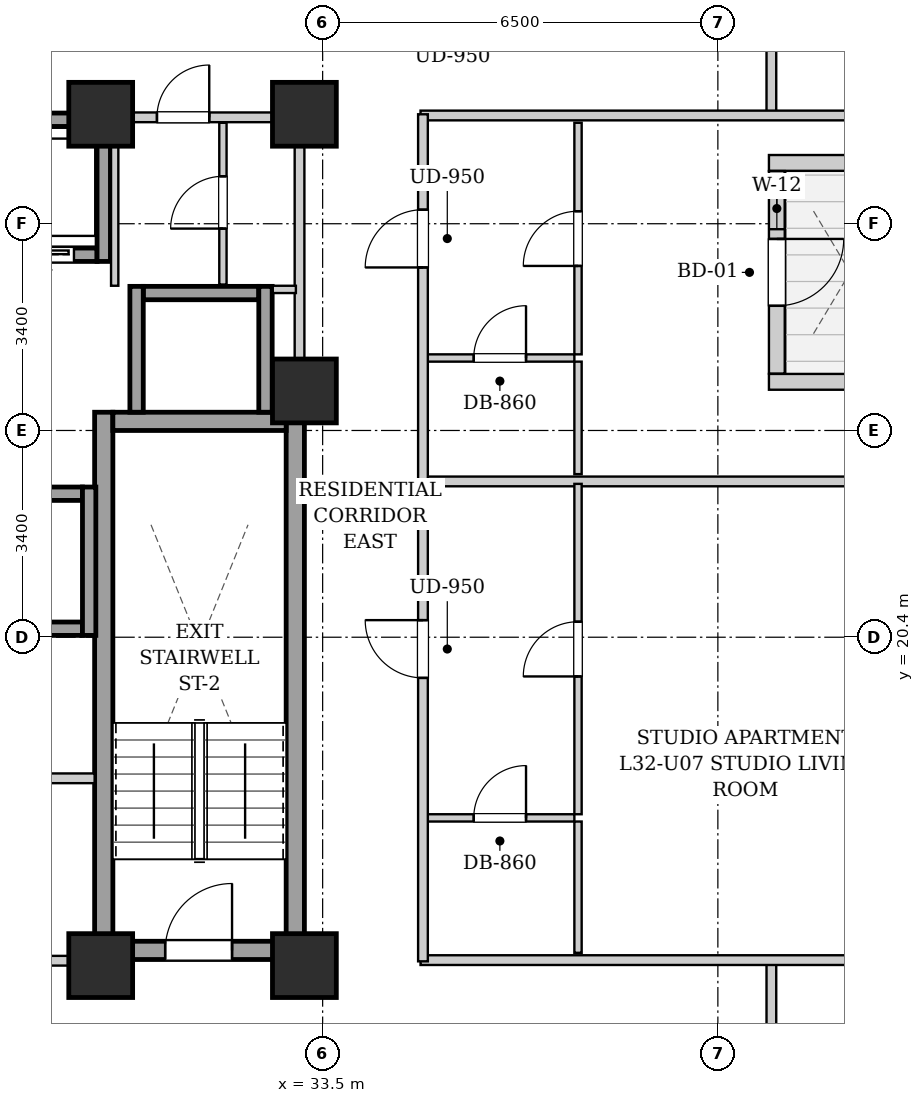
"""IFC4 building model, lengths in metres.
Left out: names, types, materials, properties, quantities, classifications, styles, units other than length and angle.
Written with IfcOpenShell. Run it as: python <this file> out.ifc"""

import sys

from ifc_helpers import new_model, si_unit, direction, frame, frame_2d, origin, origin_2d, place, context, subcontext, project, spatial, rectangle, extrude, element, fill, save


model = new_model("IFC4")
c1 = context("Model", 3, precision=1e-05, world=origin(), true_north=direction((0.0, 1.0)))
c2 = subcontext(c1, "Body", "Model", "MODEL_VIEW")
j1 = project(units=[si_unit("LENGTHUNIT", "METRE"), si_unit("PLANEANGLEUNIT", "RADIAN")], contexts=[c1])
p1 = place(None, origin())
s1 = spatial("IfcSite", under=j1, at=p1, CompositionType="ELEMENT")
p2 = place(p1, origin())
s2 = spatial("IfcBuilding", under=s1, at=p2, CompositionType="ELEMENT")
p3 = place(p2, frame((0.0, 0.0, 113.5)))
s3 = spatial("IfcBuildingStorey", under=s2, at=p3, CompositionType="ELEMENT", Elevation=113.5)
for number, where, z_axis, x_axis in (
    (1, (29.85, 15.0, 0.0), (0.0, 0.0, 1.0), (1.0, 0.0, 0.0)),
    (2, (33.2, 15.0, 0.0), (0.0, 0.0, 1.0), (1.0, 0.0, 0.0)),
    (3, (29.85, 29.0, 0.0), (0.0, 0.0, 1.0), (1.0, 0.0, 0.0)),
    (4, (33.2, 29.0, 0.0), (0.0, 0.0, 1.0), (1.0, 0.0, 0.0)),
    (5, (33.2, 24.45, 0.0), (0.0, 0.0, 1.0), (1.0, 0.0, 0.0)),
):
    element("IfcColumn", number, at=place(p3, frame(where, z_axis=z_axis, x_axis=x_axis)), inside=s3, PredefinedType="COLUMN", context=c2, shape_type="SweptSolid", body=[
        extrude(rectangle(XDim=1.05, YDim=1.05, at=origin_2d()), origin(), (0.0, 0.0, 1.0), 3.2),
    ])
p4 = place(p3, frame((43.24, 28.2, 0.0), z_axis=(0.0, 0.0, 1.0), x_axis=(-1.0, 0.0, 0.0)))
e6 = element("IfcWall", 6, at=p4, inside=s3, PredefinedType="SOLIDWALL", context=c2, shape_type="SweptSolid", body=[
    extrude(rectangle(XDim=2.4, YDim=0.26, at=frame_2d((1.2, 0.0))), origin(), (0.0, 0.0, 1.0), 2.94),
])
p5 = place(p3, frame((40.97, 28.066, 0.0), z_axis=(0.0, 0.0, 1.0), x_axis=(0.0, -1.0, 0.0)))
e7 = element("IfcWall", 7, at=p5, inside=s3, PredefinedType="SOLIDWALL", context=c2, shape_type="SweptSolid", body=[
    extrude(rectangle(XDim=3.332, YDim=0.26, at=frame_2d((1.666, 0.0))), origin(), (0.0, 0.0, 1.0), 2.94),
])
p6 = place(p5, frame((1.116, 0.0, 0.0)))
e8 = element("IfcOpeningElement", 8, at=p6, cuts=e7, PredefinedType="OPENING", context=c2, shape_type="SweptSolid", body=[
    extrude(rectangle(XDim=1.1, YDim=2.0, at=frame_2d((0.55, 1.0))), frame((0.0, 0.14, 0.0), z_axis=(0.0, -1.0, 0.0), x_axis=(1.0, 0.0, 0.0)), (0.0, 0.0, 1.0), 0.28),
])
p7 = place(p5, frame((0.276, 0.0, 0.55)))
e9 = element("IfcOpeningElement", 9, at=p7, cuts=e7, PredefinedType="OPENING", context=c2, shape_type="SweptSolid", body=[
    extrude(rectangle(XDim=0.68, YDim=1.2, at=frame_2d((0.34, 0.6))), frame((0.0, 0.14, 0.0), z_axis=(0.0, -1.0, 0.0), x_axis=(1.0, 0.0, 0.0)), (0.0, 0.0, 1.0), 0.28),
])
p8 = place(p3, frame((40.84, 24.6, 0.0), z_axis=(0.0, 0.0, 1.0), x_axis=(1.0, 0.0, 0.0)))
e10 = element("IfcWall", 10, at=p8, inside=s3, PredefinedType="SOLIDWALL", context=c2, shape_type="SweptSolid", body=[
    extrude(rectangle(XDim=2.4, YDim=0.26, at=frame_2d((1.2, 0.0))), origin(), (0.0, 0.0, 1.0), 2.94),
])
for number, where, z_axis, x_axis in (
    (11, (29.9, 15.1, 0.0), (0.0, 0.0, 1.0), (0.0, 1.0, 0.0)),
    (12, (33.05, 15.1, 0.0), (0.0, 0.0, 1.0), (0.0, 1.0, 0.0)),
):
    element("IfcWall", number, at=place(p3, frame(where, z_axis=z_axis, x_axis=x_axis)), inside=s3, PredefinedType="SHEAR", context=c2, shape_type="SweptSolid", body=[
        extrude(rectangle(XDim=9.0, YDim=0.3, at=frame_2d((4.5, 0.0))), origin(), (0.0, 0.0, 1.0), 2.94),
    ])
p9 = place(p3, frame((30.05, 23.95, 0.0), z_axis=(0.0, 0.0, 1.0), x_axis=(1.0, 0.0, 0.0)))
e13 = element("IfcWall", 13, at=p9, inside=s3, PredefinedType="SHEAR", context=c2, shape_type="SweptSolid", body=[
    extrude(rectangle(XDim=2.85, YDim=0.3, at=frame_2d((1.425, 0.0))), origin(), (0.0, 0.0, 1.0), 2.94),
])
p10 = place(p3, frame((30.05, 15.25, 0.0), z_axis=(0.0, 0.0, 1.0), x_axis=(1.0, 0.0, 0.0)))
e14 = element("IfcWall", 14, at=p10, inside=s3, PredefinedType="SHEAR", context=c2, shape_type="SweptSolid", body=[
    extrude(rectangle(XDim=2.85, YDim=0.3, at=frame_2d((1.425, 0.0))), origin(), (0.0, 0.0, 1.0), 2.94),
])
p11 = place(p10, frame((0.86, 0.0, 0.0)))
e15 = element("IfcOpeningElement", 15, at=p11, cuts=e14, PredefinedType="OPENING", context=c2, shape_type="SweptSolid", body=[
    extrude(rectangle(XDim=1.1, YDim=2.05, at=frame_2d((0.55, 1.025))), frame((0.0, 0.16, 0.0), z_axis=(0.0, -1.0, 0.0), x_axis=(1.0, 0.0, 0.0)), (0.0, 0.0, 1.0), 0.32),
])
p12 = place(p3, frame((27.93, 26.69, 0.0), z_axis=(0.0, 0.0, 1.0), x_axis=(1.0, 0.0, 0.0)))
e16 = element("IfcWall", 16, at=p12, inside=s3, PredefinedType="SHEAR", context=c2, shape_type="SweptSolid", body=[
    extrude(rectangle(XDim=1.86, YDim=0.22, at=frame_2d((0.93, 0.0))), origin(), (0.0, 0.0, 1.0), 2.94),
])
p13 = place(p12, frame((0.38, 0.0, 0.0)))
e17 = element("IfcOpeningElement", 17, at=p13, cuts=e16, PredefinedType="OPENING", context=c2, shape_type="SweptSolid", body=[
    extrude(rectangle(XDim=1.1, YDim=2.15, at=frame_2d((0.55, 1.075))), frame((0.0, 0.12, 0.0), z_axis=(0.0, -1.0, 0.0), x_axis=(1.0, 0.0, 0.0)), (0.0, 0.0, 1.0), 0.24),
])
p14 = place(p3, frame((27.93, 28.91, 0.0), z_axis=(0.0, 0.0, 1.0), x_axis=(1.0, 0.0, 0.0)))
e18 = element("IfcWall", 18, at=p14, inside=s3, PredefinedType="SHEAR", context=c2, shape_type="SweptSolid", body=[
    extrude(rectangle(XDim=1.86, YDim=0.22, at=frame_2d((0.93, 0.0))), origin(), (0.0, 0.0, 1.0), 2.94),
])
p15 = place(p3, frame((29.9, 26.58, 0.0), z_axis=(0.0, 0.0, 1.0), x_axis=(0.0, 1.0, 0.0)))
e19 = element("IfcWall", 19, at=p15, inside=s3, PredefinedType="SHEAR", context=c2, shape_type="SweptSolid", body=[
    extrude(rectangle(XDim=2.44, YDim=0.22, at=frame_2d((1.22, 0.0))), origin(), (0.0, 0.0, 1.0), 2.94),
])
for number, where, z_axis, x_axis in (
    (20, (27.65, 20.54, 0.0), (0.0, 0.0, 1.0), (1.0, 0.0, 0.0)),
    (21, (27.65, 22.76, 0.0), (0.0, 0.0, 1.0), (1.0, 0.0, 0.0)),
):
    element("IfcWall", number, at=place(p3, frame(where, z_axis=z_axis, x_axis=x_axis)), inside=s3, PredefinedType="SHEAR", context=c2, shape_type="SweptSolid", body=[
        extrude(rectangle(XDim=1.9, YDim=0.22, at=frame_2d((0.95, 0.0))), origin(), (0.0, 0.0, 1.0), 2.94),
    ])
p16 = place(p3, frame((29.66, 20.43, 0.0), z_axis=(0.0, 0.0, 1.0), x_axis=(0.0, 1.0, 0.0)))
e22 = element("IfcWall", 22, at=p16, inside=s3, PredefinedType="SHEAR", context=c2, shape_type="SweptSolid", body=[
    extrude(rectangle(XDim=2.44, YDim=0.22, at=frame_2d((1.22, 0.0))), origin(), (0.0, 0.0, 1.0), 2.94),
])
p17 = place(p3, frame((30.55, 26.06, 0.0), z_axis=(0.0, 0.0, 1.0), x_axis=(1.0, 0.0, 0.0)))
e23 = element("IfcWall", 23, at=p17, inside=s3, PredefinedType="SHEAR", context=c2, shape_type="SweptSolid", body=[
    extrude(rectangle(XDim=1.9, YDim=0.22, at=frame_2d((0.95, 0.0))), origin(), (0.0, 0.0, 1.0), 2.94),
])
for number, where, z_axis, x_axis in (
    (24, (30.44, 24.1, 0.0), (0.0, 0.0, 1.0), (0.0, 1.0, 0.0)),
    (25, (32.56, 24.1, 0.0), (0.0, 0.0, 1.0), (0.0, 1.0, 0.0)),
):
    element("IfcWall", number, at=place(p3, frame(where, z_axis=z_axis, x_axis=x_axis)), inside=s3, PredefinedType="SHEAR", context=c2, shape_type="SweptSolid", body=[
        extrude(rectangle(XDim=2.07, YDim=0.22, at=frame_2d((1.035, 0.0))), origin(), (0.0, 0.0, 1.0), 2.94),
    ])
p18 = place(p3, frame((21.25, 15.08, 0.0), z_axis=(0.0, 0.0, 1.0), x_axis=(1.0, 0.0, 0.0)))
e26 = element("IfcWall", 26, at=p18, inside=s3, PredefinedType="PARTITIONING", context=c2, shape_type="SweptSolid", body=[
    extrude(rectangle(XDim=8.5, YDim=0.16, at=frame_2d((4.25, 0.0))), origin(), (0.0, 0.0, 1.0), 2.313),
])
p19 = place(p18, frame((3.725, 0.0, 0.0)))
e27 = element("IfcOpeningElement", 27, at=p19, cuts=e26, PredefinedType="OPENING", context=c2, shape_type="SweptSolid", body=[
    extrude(rectangle(XDim=1.05, YDim=2.05, at=frame_2d((0.525, 1.025))), frame((0.0, 0.09, 0.0), z_axis=(0.0, -1.0, 0.0), x_axis=(1.0, 0.0, 0.0)), (0.0, 0.0, 1.0), 0.18),
])
p20 = place(p3, frame((28.65, 18.08, 0.0), z_axis=(0.0, 0.0, 1.0), x_axis=(1.0, 0.0, 0.0)))
e28 = element("IfcWall", 28, at=p20, inside=s3, PredefinedType="PARTITIONING", context=c2, shape_type="SweptSolid", body=[
    extrude(rectangle(XDim=1.1, YDim=0.16, at=frame_2d((0.55, 0.0))), origin(), (0.0, 0.0, 1.0), 2.94),
])
p21 = place(p3, frame((33.12, 24.12, 0.0), z_axis=(0.0, 0.0, 1.0), x_axis=(0.0, 1.0, 0.0)))
e29 = element("IfcWall", 29, at=p21, inside=s3, PredefinedType="PARTITIONING", context=c2, shape_type="SweptSolid", body=[
    extrude(rectangle(XDim=4.76, YDim=0.16, at=frame_2d((2.38, 0.0))), origin(), (0.0, 0.0, 1.0), 2.94),
])
p22 = place(p3, frame((30.08, 26.18, 0.0), z_axis=(0.0, 0.0, 1.0), x_axis=(0.0, 1.0, 0.0)))
e30 = element("IfcWall", 30, at=p22, inside=s3, PredefinedType="PARTITIONING", context=c2, shape_type="SweptSolid", body=[
    extrude(rectangle(XDim=2.68, YDim=0.12, at=frame_2d((1.34, 0.0))), origin(), (0.0, 0.0, 1.0), 2.94),
])
p23 = place(p3, frame((32.68, 26.12, 0.0), z_axis=(0.0, 0.0, 1.0), x_axis=(1.0, 0.0, 0.0)))
e31 = element("IfcWall", 31, at=p23, inside=s3, PredefinedType="PARTITIONING", context=c2, shape_type="SweptSolid", body=[
    extrude(rectangle(XDim=0.38, YDim=0.12, at=frame_2d((0.19, 0.0))), origin(), (0.0, 0.0, 1.0), 2.94),
])
p24 = place(p3, frame((31.86, 26.2, 0.0), z_axis=(0.0, 0.0, 1.0), x_axis=(0.0, 1.0, 0.0)))
e32 = element("IfcWall", 32, at=p24, inside=s3, PredefinedType="PARTITIONING", context=c2, shape_type="SweptSolid", body=[
    extrude(rectangle(XDim=2.66, YDim=0.12, at=frame_2d((1.33, 0.0))), origin(), (0.0, 0.0, 1.0), 2.94),
])
p25 = place(p24, frame((0.92, 0.0, 0.0)))
e33 = element("IfcOpeningElement", 33, at=p25, cuts=e32, PredefinedType="OPENING", context=c2, shape_type="SweptSolid", body=[
    extrude(rectangle(XDim=0.86, YDim=2.05, at=frame_2d((0.43, 1.025))), frame((0.0, 0.07, 0.0), z_axis=(0.0, -1.0, 0.0), x_axis=(1.0, 0.0, 0.0)), (0.0, 0.0, 1.0), 0.14),
])
p26 = place(p3, frame((30.08, 28.95, 0.0), z_axis=(0.0, 0.0, 1.0), x_axis=(1.0, 0.0, 0.0)))
e34 = element("IfcWall", 34, at=p26, inside=s3, PredefinedType="PARTITIONING", context=c2, shape_type="SweptSolid", body=[
    extrude(rectangle(XDim=2.96, YDim=0.16, at=frame_2d((1.48, 0.0))), origin(), (0.0, 0.0, 1.0), 2.94),
])
p27 = place(p26, frame((0.695, 0.0, 0.0)))
e35 = element("IfcOpeningElement", 35, at=p27, cuts=e34, PredefinedType="OPENING", context=c2, shape_type="SweptSolid", body=[
    extrude(rectangle(XDim=0.86, YDim=2.05, at=frame_2d((0.43, 1.025))), frame((0.0, 0.09, 0.0), z_axis=(0.0, -1.0, 0.0), x_axis=(1.0, 0.0, 0.0)), (0.0, 0.0, 1.0), 0.18),
])
for number, where, z_axis, x_axis in (
    (36, (40.88, 13.35, 0.0), (0.0, 0.0, 1.0), (0.0, 1.0, 0.0)),
    (37, (40.88, 28.98, 0.0), (0.0, 0.0, 1.0), (0.0, 1.0, 0.0)),
):
    element("IfcWall", number, at=place(p3, frame(where, z_axis=z_axis, x_axis=x_axis)), inside=s3, PredefinedType="PARTITIONING", context=c2, shape_type="SweptSolid", body=[
        extrude(rectangle(XDim=1.74, YDim=0.16, at=frame_2d((0.87, 0.0))), origin(), (0.0, 0.0, 1.0), 2.94),
    ])
for number, where, z_axis, x_axis in (
    (38, (35.11, 15.09, 0.0), (0.0, 0.0, 1.0), (1.0, 0.0, 0.0)),
    (39, (35.11, 28.98, 0.0), (0.0, 0.0, 1.0), (1.0, 0.0, 0.0)),
):
    element("IfcWall", number, at=place(p3, frame(where, z_axis=z_axis, x_axis=x_axis)), inside=s3, PredefinedType="PARTITIONING", context=c2, shape_type="SweptSolid", body=[
        extrude(rectangle(XDim=8.01, YDim=0.16, at=frame_2d((4.005, 0.0))), origin(), (0.0, 0.0, 1.0), 2.313),
    ])
p28 = place(p3, frame((35.19, 22.962, 0.0), z_axis=(0.0, 0.0, 1.0), x_axis=(1.0, 0.0, 0.0)))
e40 = element("IfcWall", 40, at=p28, inside=s3, PredefinedType="PARTITIONING", context=c2, shape_type="SweptSolid", body=[
    extrude(rectangle(XDim=7.93, YDim=0.16, at=frame_2d((3.965, 0.0))), origin(), (0.0, 0.0, 1.0), 2.94),
])
p29 = place(p3, frame((35.19, 17.429, 0.0), z_axis=(0.0, 0.0, 1.0), x_axis=(1.0, 0.0, 0.0)))
e41 = element("IfcWall", 41, at=p29, inside=s3, PredefinedType="PARTITIONING", context=c2, shape_type="SweptSolid", body=[
    extrude(rectangle(XDim=2.45, YDim=0.12, at=frame_2d((1.225, 0.0))), origin(), (0.0, 0.0, 1.0), 2.94),
])
p30 = place(p29, frame((0.795, 0.0, 0.0)))
e42 = element("IfcOpeningElement", 42, at=p30, cuts=e41, PredefinedType="OPENING", context=c2, shape_type="SweptSolid", body=[
    extrude(rectangle(XDim=0.86, YDim=2.05, at=frame_2d((0.43, 1.025))), frame((0.0, 0.07, 0.0), z_axis=(0.0, -1.0, 0.0), x_axis=(1.0, 0.0, 0.0)), (0.0, 0.0, 1.0), 0.14),
])
p31 = place(p3, frame((37.7, 15.21, 0.0), z_axis=(0.0, 0.0, 1.0), x_axis=(0.0, 1.0, 0.0)))
e43 = element("IfcWall", 43, at=p31, inside=s3, PredefinedType="PARTITIONING", context=c2, shape_type="SweptSolid", body=[
    extrude(rectangle(XDim=2.159, YDim=0.12, at=frame_2d((1.08, 0.0))), origin(), (0.0, 0.0, 1.0), 2.94),
])
p32 = place(p3, frame((37.7, 17.489, 0.0), z_axis=(0.0, 0.0, 1.0), x_axis=(0.0, 1.0, 0.0)))
e44 = element("IfcWall", 44, at=p32, inside=s3, PredefinedType="PARTITIONING", context=c2, shape_type="SweptSolid", body=[
    extrude(rectangle(XDim=5.433, YDim=0.12, at=frame_2d((2.717, 0.0))), origin(), (0.0, 0.0, 1.0), 2.94),
])
p33 = place(p32, frame((2.266, 0.0, 0.0)))
e45 = element("IfcOpeningElement", 45, at=p33, cuts=e44, PredefinedType="OPENING", context=c2, shape_type="SweptSolid", body=[
    extrude(rectangle(XDim=0.9, YDim=2.05, at=frame_2d((0.45, 1.025))), frame((0.0, 0.07, 0.0), z_axis=(0.0, -1.0, 0.0), x_axis=(1.0, 0.0, 0.0)), (0.0, 0.0, 1.0), 0.14),
])
p34 = place(p3, frame((35.19, 24.992, 0.0), z_axis=(0.0, 0.0, 1.0), x_axis=(1.0, 0.0, 0.0)))
e46 = element("IfcWall", 46, at=p34, inside=s3, PredefinedType="PARTITIONING", context=c2, shape_type="SweptSolid", body=[
    extrude(rectangle(XDim=2.45, YDim=0.12, at=frame_2d((1.225, 0.0))), origin(), (0.0, 0.0, 1.0), 2.94),
])
p35 = place(p34, frame((0.795, 0.0, 0.0)))
e47 = element("IfcOpeningElement", 47, at=p35, cuts=e46, PredefinedType="OPENING", context=c2, shape_type="SweptSolid", body=[
    extrude(rectangle(XDim=0.86, YDim=2.05, at=frame_2d((0.43, 1.025))), frame((0.0, 0.07, 0.0), z_axis=(0.0, -1.0, 0.0), x_axis=(1.0, 0.0, 0.0)), (0.0, 0.0, 1.0), 0.14),
])
p36 = place(p3, frame((37.7, 23.082, 0.0), z_axis=(0.0, 0.0, 1.0), x_axis=(0.0, 1.0, 0.0)))
e48 = element("IfcWall", 48, at=p36, inside=s3, PredefinedType="PARTITIONING", context=c2, shape_type="SweptSolid", body=[
    extrude(rectangle(XDim=1.85, YDim=0.12, at=frame_2d((0.925, 0.0))), origin(), (0.0, 0.0, 1.0), 2.94),
])
p37 = place(p3, frame((37.7, 25.052, 0.0), z_axis=(0.0, 0.0, 1.0), x_axis=(0.0, 1.0, 0.0)))
e49 = element("IfcWall", 49, at=p37, inside=s3, PredefinedType="PARTITIONING", context=c2, shape_type="SweptSolid", body=[
    extrude(rectangle(XDim=3.808, YDim=0.12, at=frame_2d((1.904, 0.0))), origin(), (0.0, 0.0, 1.0), 2.94),
])
p38 = place(p37, frame((1.454, 0.0, 0.0)))
e50 = element("IfcOpeningElement", 50, at=p38, cuts=e49, PredefinedType="OPENING", context=c2, shape_type="SweptSolid", body=[
    extrude(rectangle(XDim=0.9, YDim=2.05, at=frame_2d((0.45, 1.025))), frame((0.0, 0.07, 0.0), z_axis=(0.0, -1.0, 0.0), x_axis=(1.0, 0.0, 0.0)), (0.0, 0.0, 1.0), 0.14),
])
p39 = place(p3, frame((35.15, 15.07, 0.0), z_axis=(0.0, 0.0, 1.0), x_axis=(0.0, 1.0, 0.0)))
e51 = element("IfcWall", 51, at=p39, inside=s3, PredefinedType="PARTITIONING", context=c2, shape_type="SweptSolid", body=[
    extrude(rectangle(XDim=13.93, YDim=0.16, at=frame_2d((6.965, 0.0))), origin(), (0.0, 0.0, 1.0), 2.94),
])
p40 = place(p39, frame((4.661, 0.0, 0.0)))
e52 = element("IfcOpeningElement", 52, at=p40, cuts=e51, PredefinedType="OPENING", context=c2, shape_type="SweptSolid", body=[
    extrude(rectangle(XDim=0.95, YDim=2.1, at=frame_2d((0.475, 1.05))), frame((0.0, 0.09, 0.0), z_axis=(0.0, -1.0, 0.0), x_axis=(1.0, 0.0, 0.0)), (0.0, 0.0, 1.0), 0.18),
])
p41 = place(p39, frame((11.411, 0.0, 0.0)))
e53 = element("IfcOpeningElement", 53, at=p41, cuts=e51, PredefinedType="OPENING", context=c2, shape_type="SweptSolid", body=[
    extrude(rectangle(XDim=0.95, YDim=2.1, at=frame_2d((0.475, 1.05))), frame((0.0, 0.09, 0.0), z_axis=(0.0, -1.0, 0.0), x_axis=(1.0, 0.0, 0.0)), (0.0, 0.0, 1.0), 0.18),
])
p42 = place(p11, origin())
e54 = element("IfcDoor", 54, at=p42, inside=s3, OperationType="SINGLE_SWING_RIGHT", PredefinedType="DOOR", context=c2, shape_type="SweptSolid", body=[
    extrude(rectangle(XDim=1.1, YDim=2.05, at=frame_2d((0.55, 1.025))), frame((0.0, 0.025, 0.0), z_axis=(0.0, -1.0, 0.0), x_axis=(1.0, 0.0, 0.0)), (0.0, 0.0, 1.0), 0.05),
])
fill(e15, e54)
p43 = place(p13, origin())
e55 = element("IfcDoor", 55, at=p43, inside=s3, OperationType="SLIDING_TO_LEFT", PredefinedType="DOOR", context=c2, shape_type="SweptSolid", body=[
    extrude(rectangle(XDim=1.1, YDim=2.15, at=frame_2d((0.55, 1.075))), frame((0.0, 0.025, 0.0), z_axis=(0.0, -1.0, 0.0), x_axis=(1.0, 0.0, 0.0)), (0.0, 0.0, 1.0), 0.05),
])
fill(e17, e55)
p44 = place(p25, origin())
e56 = element("IfcDoor", 56, at=p44, inside=s3, OperationType="SINGLE_SWING_LEFT", PredefinedType="DOOR", context=c2, shape_type="SweptSolid", body=[
    extrude(rectangle(XDim=0.86, YDim=2.05, at=frame_2d((0.43, 1.025))), frame((0.0, 0.025, 0.0), z_axis=(0.0, -1.0, 0.0), x_axis=(1.0, 0.0, 0.0)), (0.0, 0.0, 1.0), 0.05),
])
fill(e33, e56)
p45 = place(p27, origin())
e57 = element("IfcDoor", 57, at=p45, inside=s3, OperationType="SINGLE_SWING_RIGHT", PredefinedType="DOOR", context=c2, shape_type="SweptSolid", body=[
    extrude(rectangle(XDim=0.86, YDim=2.05, at=frame_2d((0.43, 1.025))), frame((0.0, 0.025, 0.0), z_axis=(0.0, -1.0, 0.0), x_axis=(1.0, 0.0, 0.0)), (0.0, 0.0, 1.0), 0.05),
])
fill(e35, e57)
p46 = place(p30, origin())
e58 = element("IfcDoor", 58, at=p46, inside=s3, OperationType="SINGLE_SWING_RIGHT", PredefinedType="DOOR", context=c2, shape_type="SweptSolid", body=[
    extrude(rectangle(XDim=0.86, YDim=2.05, at=frame_2d((0.43, 1.025))), frame((0.0, 0.025, 0.0), z_axis=(0.0, -1.0, 0.0), x_axis=(1.0, 0.0, 0.0)), (0.0, 0.0, 1.0), 0.05),
])
fill(e42, e58)
p47 = place(p33, origin())
e59 = element("IfcDoor", 59, at=p47, inside=s3, OperationType="SINGLE_SWING_LEFT", PredefinedType="DOOR", context=c2, shape_type="SweptSolid", body=[
    extrude(rectangle(XDim=0.9, YDim=2.05, at=frame_2d((0.45, 1.025))), frame((0.0, 0.025, 0.0), z_axis=(0.0, -1.0, 0.0), x_axis=(1.0, 0.0, 0.0)), (0.0, 0.0, 1.0), 0.05),
])
fill(e45, e59)
p48 = place(p35, origin())
e60 = element("IfcDoor", 60, at=p48, inside=s3, OperationType="SINGLE_SWING_RIGHT", PredefinedType="DOOR", context=c2, shape_type="SweptSolid", body=[
    extrude(rectangle(XDim=0.86, YDim=2.05, at=frame_2d((0.43, 1.025))), frame((0.0, 0.025, 0.0), z_axis=(0.0, -1.0, 0.0), x_axis=(1.0, 0.0, 0.0)), (0.0, 0.0, 1.0), 0.05),
])
fill(e47, e60)
p49 = place(p38, origin())
e61 = element("IfcDoor", 61, at=p49, inside=s3, OperationType="SINGLE_SWING_LEFT", PredefinedType="DOOR", context=c2, shape_type="SweptSolid", body=[
    extrude(rectangle(XDim=0.9, YDim=2.05, at=frame_2d((0.45, 1.025))), frame((0.0, 0.025, 0.0), z_axis=(0.0, -1.0, 0.0), x_axis=(1.0, 0.0, 0.0)), (0.0, 0.0, 1.0), 0.05),
])
fill(e50, e61)
p50 = place(p40, origin())
e62 = element("IfcDoor", 62, at=p50, inside=s3, OperationType="SINGLE_SWING_RIGHT", PredefinedType="DOOR", context=c2, shape_type="SweptSolid", body=[
    extrude(rectangle(XDim=0.95, YDim=2.1, at=frame_2d((0.475, 1.05))), frame((0.0, 0.025, 0.0), z_axis=(0.0, -1.0, 0.0), x_axis=(1.0, 0.0, 0.0)), (0.0, 0.0, 1.0), 0.05),
])
fill(e52, e62)
p51 = place(p41, origin())
e63 = element("IfcDoor", 63, at=p51, inside=s3, OperationType="SINGLE_SWING_LEFT", PredefinedType="DOOR", context=c2, shape_type="SweptSolid", body=[
    extrude(rectangle(XDim=0.95, YDim=2.1, at=frame_2d((0.475, 1.05))), frame((0.0, 0.025, 0.0), z_axis=(0.0, -1.0, 0.0), x_axis=(1.0, 0.0, 0.0)), (0.0, 0.0, 1.0), 0.05),
])
fill(e53, e63)
p52 = place(p6, origin())
e64 = element("IfcDoor", 64, at=p52, inside=s3, OperationType="SINGLE_SWING_LEFT", PredefinedType="DOOR", context=c2, shape_type="SweptSolid", body=[
    extrude(rectangle(XDim=1.1, YDim=2.0, at=frame_2d((0.55, 1.0))), frame((0.0, 0.025, 0.0), z_axis=(0.0, -1.0, 0.0), x_axis=(1.0, 0.0, 0.0)), (0.0, 0.0, 1.0), 0.05),
])
fill(e8, e64)
p53 = place(p7, origin())
e65 = element("IfcWindow", 65, at=p53, inside=s3, PartitioningType="SINGLE_PANEL", PredefinedType="WINDOW", context=c2, shape_type="SweptSolid", body=[
    extrude(rectangle(XDim=0.68, YDim=1.2, at=frame_2d((0.34, 0.6))), frame((0.0, 0.03, 0.0), z_axis=(0.0, -1.0, 0.0), x_axis=(1.0, 0.0, 0.0)), (0.0, 0.0, 1.0), 0.06),
])
fill(e9, e65)
save(model, sys.argv[1])
